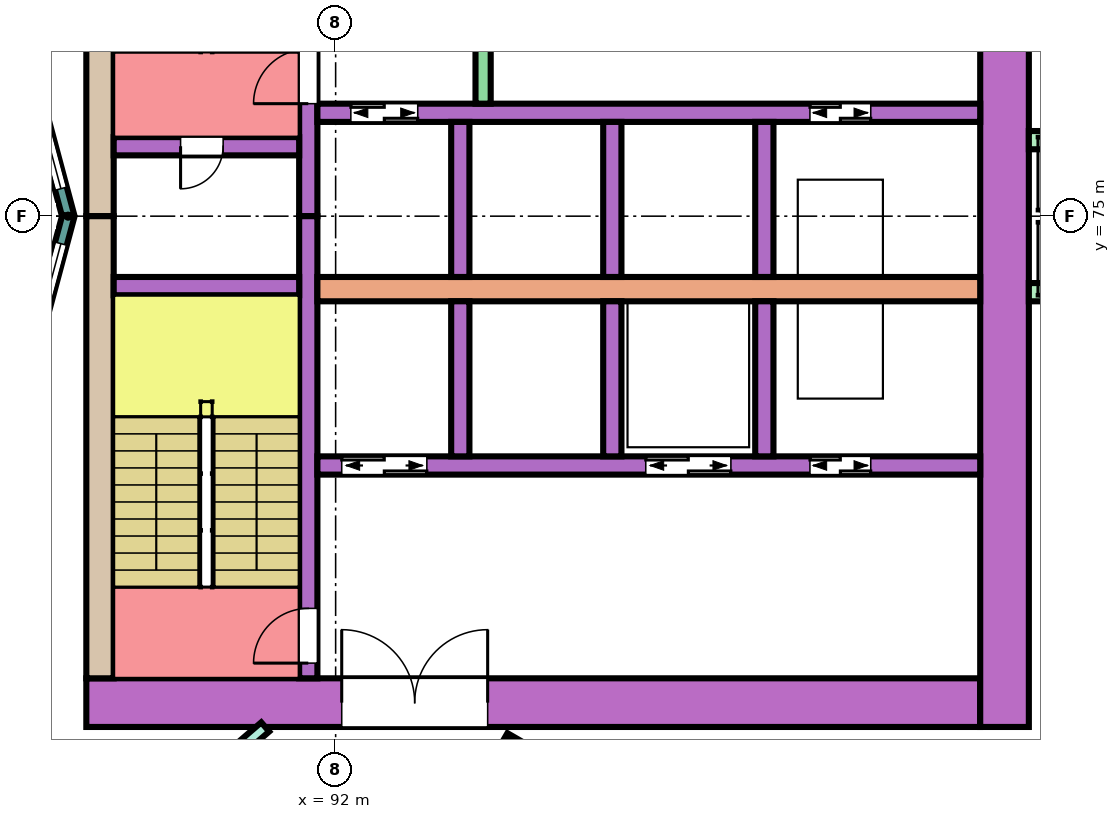
"""IFC4 building model, lengths in metres.
Left out: names, types, materials, properties, quantities, classifications, styles, units other than length and angle.
Written with IfcOpenShell. Run it as: python <this file> out.ifc"""

import sys

from ifc_helpers import new_model, si_unit, direction, frame, frame_2d, origin, place, context, subcontext, project, spatial, rectangle, extrude, element, fill, save


model = new_model("IFC4")
c1 = context("Model", 3, precision=1e-05, world=origin(), true_north=direction((0.0, 1.0)))
c2 = subcontext(c1, "Body", "Model", "MODEL_VIEW")
j1 = project(units=[si_unit("LENGTHUNIT", "METRE"), si_unit("PLANEANGLEUNIT", "RADIAN")], contexts=[c1])
p1 = place(None, origin())
s1 = spatial("IfcSite", under=j1, at=p1, CompositionType="ELEMENT")
p2 = place(p1, origin())
s2 = spatial("IfcBuilding", under=s1, at=p2, CompositionType="ELEMENT")
p3 = place(p2, frame((0.0, 0.0, 28.8)))
s3 = spatial("IfcBuildingStorey", under=s2, at=p3, CompositionType="ELEMENT", Elevation=28.8)
p4 = place(p3, frame((87.9, 67.0, 0.0), z_axis=(0.0, 0.0, 1.0), x_axis=(1.0, 0.0, 0.0)))
e1 = element("IfcWall", 1, at=p4, inside=s3, PredefinedType="SHEAR", context=c2, shape_type="SweptSolid", body=[
    extrude(rectangle(XDim=14.7, YDim=0.8, at=frame_2d((7.35, 0.0))), origin(), (0.0, 0.0, 1.0), 3.48),
])
p5 = place(p4, frame((4.2, 0.0, 0.0)))
e2 = element("IfcOpeningElement", 2, at=p5, cuts=e1, PredefinedType="OPENING", context=c2, shape_type="SweptSolid", body=[
    extrude(rectangle(XDim=2.4, YDim=2.4, at=frame_2d((1.2, 1.2))), frame((0.0, 0.41, 0.0), z_axis=(0.0, -1.0, 0.0), x_axis=(1.0, 0.0, 0.0)), (0.0, 0.0, 1.0), 0.82),
])
for number, where, z_axis, x_axis in (
    (3, (88.125, 75.0, 0.0), (0.0, 0.0, 1.0), (0.0, 1.0, 0.0)),
    (4, (88.125, 67.4, 0.0), (0.0, 0.0, 1.0), (0.0, 1.0, 0.0)),
):
    element("IfcWall", number, at=place(p3, frame(where, z_axis=z_axis, x_axis=x_axis)), inside=s3, PredefinedType="SHEAR", context=c2, shape_type="SweptSolid", body=[
        extrude(rectangle(XDim=7.6, YDim=0.45, at=frame_2d((3.8, 0.0))), origin(), (0.0, 0.0, 1.0), 3.48),
    ])
p6 = place(p3, frame((103.0, 66.6, 0.0), z_axis=(0.0, 0.0, 1.0), x_axis=(0.0, 1.0, 0.0)))
e5 = element("IfcWall", 5, at=p6, inside=s3, PredefinedType="SHEAR", context=c2, shape_type="SweptSolid", body=[
    extrude(rectangle(XDim=16.8, YDim=0.8, at=frame_2d((8.4, 0.0))), origin(), (0.0, 0.0, 1.0), 3.48),
])
p7 = place(p3, frame((91.55, 75.0, 0.0), z_axis=(0.0, 0.0, 1.0), x_axis=(0.0, 1.0, 0.0)))
e6 = element("IfcWall", 6, at=p7, inside=s3, PredefinedType="SHEAR", context=c2, shape_type="SweptSolid", body=[
    extrude(rectangle(XDim=7.6, YDim=0.3, at=frame_2d((3.8, 0.0))), origin(), (0.0, 0.0, 1.0), 3.48),
])
p8 = place(p7, frame((1.85, 0.0, 0.0)))
e7 = element("IfcOpeningElement", 7, at=p8, cuts=e6, PredefinedType="OPENING", context=c2, shape_type="SweptSolid", body=[
    extrude(rectangle(XDim=0.9, YDim=2.1, at=frame_2d((0.45, 1.05))), frame((0.0, 0.16, 0.0), z_axis=(0.0, -1.0, 0.0), x_axis=(1.0, 0.0, 0.0)), (0.0, 0.0, 1.0), 0.32),
])
p9 = place(p3, frame((91.55, 67.4, 0.0), z_axis=(0.0, 0.0, 1.0), x_axis=(0.0, 1.0, 0.0)))
e8 = element("IfcWall", 8, at=p9, inside=s3, PredefinedType="SHEAR", context=c2, shape_type="SweptSolid", body=[
    extrude(rectangle(XDim=7.6, YDim=0.3, at=frame_2d((3.8, 0.0))), origin(), (0.0, 0.0, 1.0), 3.48),
])
p10 = place(p9, frame((0.25, 0.0, 0.0)))
e9 = element("IfcOpeningElement", 9, at=p10, cuts=e8, PredefinedType="OPENING", context=c2, shape_type="SweptSolid", body=[
    extrude(rectangle(XDim=0.9, YDim=2.1, at=frame_2d((0.45, 1.05))), frame((0.0, 0.16, 0.0), z_axis=(0.0, -1.0, 0.0), x_axis=(1.0, 0.0, 0.0)), (0.0, 0.0, 1.0), 0.32),
])
p11 = place(p3, frame((88.35, 76.15, 0.0), z_axis=(0.0, 0.0, 1.0), x_axis=(1.0, 0.0, 0.0)))
e10 = element("IfcWall", 10, at=p11, inside=s3, PredefinedType="SHEAR", context=c2, shape_type="SweptSolid", body=[
    extrude(rectangle(XDim=3.05, YDim=0.3, at=frame_2d((1.525, 0.0))), origin(), (0.0, 0.0, 1.0), 3.48),
])
p12 = place(p11, frame((1.1, 0.0, 0.0)))
e11 = element("IfcOpeningElement", 11, at=p12, cuts=e10, PredefinedType="OPENING", context=c2, shape_type="SweptSolid", body=[
    extrude(rectangle(XDim=0.7, YDim=2.0, at=frame_2d((0.35, 1.0))), frame((0.0, 0.16, 0.0), z_axis=(0.0, -1.0, 0.0), x_axis=(1.0, 0.0, 0.0)), (0.0, 0.0, 1.0), 0.32),
])
p13 = place(p3, frame((88.35, 73.85, 0.0), z_axis=(0.0, 0.0, 1.0), x_axis=(1.0, 0.0, 0.0)))
e12 = element("IfcWall", 12, at=p13, inside=s3, PredefinedType="SHEAR", context=c2, shape_type="SweptSolid", body=[
    extrude(rectangle(XDim=3.05, YDim=0.3, at=frame_2d((1.525, 0.0))), origin(), (0.0, 0.0, 1.0), 3.48),
])
p14 = place(p3, frame((91.7, 76.7, 0.0), z_axis=(0.0, 0.0, 1.0), x_axis=(1.0, 0.0, 0.0)))
e13 = element("IfcWall", 13, at=p14, inside=s3, PredefinedType="SHEAR", context=c2, shape_type="SweptSolid", body=[
    extrude(rectangle(XDim=10.9, YDim=0.3, at=frame_2d((5.45, 0.0))), origin(), (0.0, 0.0, 1.0), 3.48),
])
p15 = place(p14, frame((0.55, 0.0, 0.0)))
e14 = element("IfcOpeningElement", 14, at=p15, cuts=e13, PredefinedType="OPENING", context=c2, shape_type="SweptSolid", body=[
    extrude(rectangle(XDim=1.1, YDim=2.1, at=frame_2d((0.55, 1.05))), frame((0.0, 0.16, 0.0), z_axis=(0.0, -1.0, 0.0), x_axis=(1.0, 0.0, 0.0)), (0.0, 0.0, 1.0), 0.32),
])
p16 = place(p14, frame((8.1, 0.0, 0.0)))
e15 = element("IfcOpeningElement", 15, at=p16, cuts=e13, PredefinedType="OPENING", context=c2, shape_type="SweptSolid", body=[
    extrude(rectangle(XDim=1.0, YDim=2.1, at=frame_2d((0.5, 1.05))), frame((0.0, 0.16, 0.0), z_axis=(0.0, -1.0, 0.0), x_axis=(1.0, 0.0, 0.0)), (0.0, 0.0, 1.0), 0.32),
])
p17 = place(p3, frame((91.7, 73.8, 0.0), z_axis=(0.0, 0.0, 1.0), x_axis=(1.0, 0.0, 0.0)))
e16 = element("IfcWall", 16, at=p17, inside=s3, PredefinedType="SHEAR", context=c2, shape_type="SweptSolid", body=[
    extrude(rectangle(XDim=10.9, YDim=0.4, at=frame_2d((5.45, 0.0))), origin(), (0.0, 0.0, 1.0), 3.48),
])
p18 = place(p3, frame((91.7, 70.9, 0.0), z_axis=(0.0, 0.0, 1.0), x_axis=(1.0, 0.0, 0.0)))
e17 = element("IfcWall", 17, at=p18, inside=s3, PredefinedType="SHEAR", context=c2, shape_type="SweptSolid", body=[
    extrude(rectangle(XDim=10.9, YDim=0.3, at=frame_2d((5.45, 0.0))), origin(), (0.0, 0.0, 1.0), 3.48),
])
p19 = place(p18, frame((0.4, 0.0, 0.0)))
e18 = element("IfcOpeningElement", 18, at=p19, cuts=e17, PredefinedType="OPENING", context=c2, shape_type="SweptSolid", body=[
    extrude(rectangle(XDim=1.4, YDim=2.1, at=frame_2d((0.7, 1.05))), frame((0.0, 0.16, 0.0), z_axis=(0.0, -1.0, 0.0), x_axis=(1.0, 0.0, 0.0)), (0.0, 0.0, 1.0), 0.32),
])
p20 = place(p18, frame((5.4, 0.0, 0.0)))
e19 = element("IfcOpeningElement", 19, at=p20, cuts=e17, PredefinedType="OPENING", context=c2, shape_type="SweptSolid", body=[
    extrude(rectangle(XDim=1.4, YDim=2.1, at=frame_2d((0.7, 1.05))), frame((0.0, 0.16, 0.0), z_axis=(0.0, -1.0, 0.0), x_axis=(1.0, 0.0, 0.0)), (0.0, 0.0, 1.0), 0.32),
])
p21 = place(p18, frame((8.1, 0.0, 0.0)))
e20 = element("IfcOpeningElement", 20, at=p21, cuts=e17, PredefinedType="OPENING", context=c2, shape_type="SweptSolid", body=[
    extrude(rectangle(XDim=1.0, YDim=2.1, at=frame_2d((0.5, 1.05))), frame((0.0, 0.16, 0.0), z_axis=(0.0, -1.0, 0.0), x_axis=(1.0, 0.0, 0.0)), (0.0, 0.0, 1.0), 0.32),
])
for number, where, z_axis, x_axis in (
    (21, (94.05, 74.0, 0.0), (0.0, 0.0, 1.0), (0.0, 1.0, 0.0)),
    (22, (96.55, 74.0, 0.0), (0.0, 0.0, 1.0), (0.0, 1.0, 0.0)),
    (23, (99.05, 74.0, 0.0), (0.0, 0.0, 1.0), (0.0, 1.0, 0.0)),
    (24, (94.05, 71.05, 0.0), (0.0, 0.0, 1.0), (0.0, 1.0, 0.0)),
    (25, (96.55, 71.05, 0.0), (0.0, 0.0, 1.0), (0.0, 1.0, 0.0)),
    (26, (99.05, 71.05, 0.0), (0.0, 0.0, 1.0), (0.0, 1.0, 0.0)),
):
    element("IfcWall", number, at=place(p3, frame(where, z_axis=z_axis, x_axis=x_axis)), inside=s3, PredefinedType="SHEAR", context=c2, shape_type="SweptSolid", body=[
        extrude(rectangle(XDim=2.55, YDim=0.3, at=frame_2d((1.275, 0.0))), origin(), (0.0, 0.0, 1.0), 3.48),
    ])
p22 = place(p3, frame((94.425, 76.85, 0.0), z_axis=(0.0, 0.0, 1.0), x_axis=(0.0, 1.0, 0.0)))
e27 = element("IfcWall", 27, at=p22, inside=s3, PredefinedType="SHEAR", context=c2, shape_type="SweptSolid", body=[
    extrude(rectangle(XDim=1.5, YDim=0.25, at=frame_2d((0.75, 0.0))), origin(), (0.0, 0.0, 1.0), 3.48),
])
p23 = place(p3, frame((102.429, 62.051, 0.0), z_axis=(0.0, 0.0, 1.0), x_axis=(0.382694096902, 0.923875115043, 0.0)))
e28 = element("IfcWall", 28, at=p23, inside=s3, PredefinedType="NOTDEFINED", context=c2, shape_type="SweptSolid", body=[
    extrude(rectangle(XDim=6.761, YDim=0.2, at=frame_2d((3.38, 0.0))), origin(), (0.0, 0.0, 1.0), 3.8),
])
p24 = place(p23, frame((0.527, 0.0, 0.9)))
e29 = element("IfcOpeningElement", 29, at=p24, cuts=e28, PredefinedType="OPENING", context=c2, shape_type="SweptSolid", body=[
    extrude(rectangle(XDim=1.2, YDim=2.4, at=frame_2d((0.6, 1.2))), frame((0.0, 0.11, 0.0), z_axis=(0.0, -1.0, 0.0), x_axis=(1.0, 0.0, 0.0)), (0.0, 0.0, 1.0), 0.22),
])
p25 = place(p23, frame((2.48, 0.0, 0.0)))
e30 = element("IfcOpeningElement", 30, at=p25, cuts=e28, PredefinedType="OPENING", context=c2, shape_type="SweptSolid", body=[
    extrude(rectangle(XDim=1.8, YDim=2.4, at=frame_2d((0.9, 1.2))), frame((0.0, 0.11, 0.0), z_axis=(0.0, -1.0, 0.0), x_axis=(1.0, 0.0, 0.0)), (0.0, 0.0, 1.0), 0.22),
])
p26 = place(p23, frame((5.034, 0.0, 0.9)))
e31 = element("IfcOpeningElement", 31, at=p26, cuts=e28, PredefinedType="OPENING", context=c2, shape_type="SweptSolid", body=[
    extrude(rectangle(XDim=1.2, YDim=2.4, at=frame_2d((0.6, 1.2))), frame((0.0, 0.11, 0.0), z_axis=(0.0, -1.0, 0.0), x_axis=(1.0, 0.0, 0.0)), (0.0, 0.0, 1.0), 0.22),
])
for number, where, z_axis, x_axis in (
    (32, (103.4, 73.75, 0.0), (0.0, 0.0, 1.0), (1.0, 0.0, 0.0)),
    (33, (103.4, 76.25, 0.0), (0.0, 0.0, 1.0), (1.0, 0.0, 0.0)),
):
    element("IfcWall", number, at=place(p3, frame(where, z_axis=z_axis, x_axis=x_axis)), inside=s3, PredefinedType="NOTDEFINED", context=c2, shape_type="SweptSolid", body=[
        extrude(rectangle(XDim=2.416, YDim=0.3, at=frame_2d((1.208, 0.0))), origin(), (0.0, 0.0, 1.0), 3.8),
    ])
p27 = place(p3, frame((87.604, 75.0, 0.0), z_axis=(0.0, 0.0, 1.0), x_axis=(-0.258789828301, 0.965933654434, 0.0)))
e34 = element("IfcWall", 34, at=p27, inside=s3, PredefinedType="NOTDEFINED", context=c2, shape_type="SweptSolid", body=[
    extrude(rectangle(XDim=3.936, YDim=0.2, at=frame_2d((1.968, 0.0))), origin(), (0.0, 0.0, 1.0), 3.8),
])
p28 = place(p27, frame((0.468, 0.0, 0.9)))
e35 = element("IfcOpeningElement", 35, at=p28, cuts=e34, PredefinedType="OPENING", context=c2, shape_type="SweptSolid", body=[
    extrude(rectangle(XDim=3.0, YDim=2.3, at=frame_2d((1.5, 1.15))), frame((0.0, 0.11, 0.0), z_axis=(0.0, -1.0, 0.0), x_axis=(1.0, 0.0, 0.0)), (0.0, 0.0, 1.0), 0.22),
])
p29 = place(p3, frame((86.585, 71.198, 0.0), z_axis=(0.0, 0.0, 1.0), x_axis=(0.258789828301, 0.965933654434, 0.0)))
e36 = element("IfcWall", 36, at=p29, inside=s3, PredefinedType="NOTDEFINED", context=c2, shape_type="SweptSolid", body=[
    extrude(rectangle(XDim=3.936, YDim=0.2, at=frame_2d((1.968, 0.0))), origin(), (0.0, 0.0, 1.0), 3.8),
])
p30 = place(p29, frame((0.468, 0.0, 0.9)))
e37 = element("IfcOpeningElement", 37, at=p30, cuts=e36, PredefinedType="OPENING", context=c2, shape_type="SweptSolid", body=[
    extrude(rectangle(XDim=3.0, YDim=2.3, at=frame_2d((1.5, 1.15))), frame((0.0, 0.11, 0.0), z_axis=(0.0, -1.0, 0.0), x_axis=(1.0, 0.0, 0.0)), (0.0, 0.0, 1.0), 0.22),
])
p31 = place(p3, frame((86.877, 63.189, 0.0), z_axis=(0.0, 0.0, 1.0), x_axis=(0.758075808328, 0.652166442581, 0.0)))
e38 = element("IfcWall", 38, at=p31, inside=s3, PredefinedType="PARTITIONING", context=c2, shape_type="SweptSolid", body=[
    extrude(rectangle(XDim=5.23, YDim=0.2, at=frame_2d((2.615, 0.0))), origin(), (0.0, 0.0, 1.0), 3.35),
])
p32 = place(p31, frame((2.165, 0.0, 0.0)))
e39 = element("IfcOpeningElement", 39, at=p32, cuts=e38, PredefinedType="OPENING", context=c2, shape_type="SweptSolid", body=[
    extrude(rectangle(XDim=0.9, YDim=2.1, at=frame_2d((0.45, 1.05))), frame((0.0, 0.11, 0.0), z_axis=(0.0, -1.0, 0.0), x_axis=(1.0, 0.0, 0.0)), (0.0, 0.0, 1.0), 0.22),
])
p33 = place(p3, frame((94.8, 66.455, 0.0), z_axis=(0.0, 0.0, 1.0), x_axis=(0.86602264145, -0.500004784474, 0.0)))
e40 = element("IfcWall", 40, at=p33, inside=s3, PredefinedType="PARTITIONING", context=c2, shape_type="SweptSolid", body=[
    extrude(rectangle(XDim=8.708, YDim=0.1, at=frame_2d((4.354, 0.0))), origin(), (0.0, 0.0, 1.0), 3.35),
])
p34 = place(p33, frame((3.879, 0.0, 0.0)))
e41 = element("IfcOpeningElement", 41, at=p34, cuts=e40, PredefinedType="OPENING", context=c2, shape_type="SweptSolid", body=[
    extrude(rectangle(XDim=0.9, YDim=2.1, at=frame_2d((0.45, 1.05))), frame((0.0, 0.06, 0.0), z_axis=(0.0, -1.0, 0.0), x_axis=(1.0, 0.0, 0.0)), (0.0, 0.0, 1.0), 0.12),
])
p35 = place(p28, origin())
e42 = element("IfcWindow", 42, at=p35, inside=s3, PartitioningType="SINGLE_PANEL", PredefinedType="WINDOW", context=c2, shape_type="SweptSolid", body=[
    extrude(rectangle(XDim=3.0, YDim=2.3, at=frame_2d((1.5, 1.15))), frame((0.0, 0.03, 0.0), z_axis=(0.0, -1.0, 0.0), x_axis=(1.0, 0.0, 0.0)), (0.0, 0.0, 1.0), 0.06),
])
fill(e35, e42)
p36 = place(p30, origin())
e43 = element("IfcWindow", 43, at=p36, inside=s3, PartitioningType="SINGLE_PANEL", PredefinedType="WINDOW", context=c2, shape_type="SweptSolid", body=[
    extrude(rectangle(XDim=3.0, YDim=2.3, at=frame_2d((1.5, 1.15))), frame((0.0, 0.03, 0.0), z_axis=(0.0, -1.0, 0.0), x_axis=(1.0, 0.0, 0.0)), (0.0, 0.0, 1.0), 0.06),
])
fill(e37, e43)
p37 = place(p12, frame((0.7, 0.0, 0.0), z_axis=(0.0, 0.0, 1.0), x_axis=(-1.0, 0.0, 0.0)))
e44 = element("IfcDoor", 44, at=p37, inside=s3, OperationType="SINGLE_SWING_RIGHT", PredefinedType="DOOR", context=c2, shape_type="SweptSolid", body=[
    extrude(rectangle(XDim=0.7, YDim=2.0, at=frame_2d((0.35, 1.0))), frame((0.0, 0.025, 0.0), z_axis=(0.0, -1.0, 0.0), x_axis=(1.0, 0.0, 0.0)), (0.0, 0.0, 1.0), 0.05),
])
fill(e11, e44)
p38 = place(p8, origin())
e45 = element("IfcDoor", 45, at=p38, inside=s3, OperationType="SINGLE_SWING_LEFT", PredefinedType="DOOR", context=c2, shape_type="SweptSolid", body=[
    extrude(rectangle(XDim=0.9, YDim=2.1, at=frame_2d((0.45, 1.05))), frame((0.0, 0.025, 0.0), z_axis=(0.0, -1.0, 0.0), x_axis=(1.0, 0.0, 0.0)), (0.0, 0.0, 1.0), 0.05),
])
fill(e7, e45)
p39 = place(p10, origin())
e46 = element("IfcDoor", 46, at=p39, inside=s3, OperationType="SINGLE_SWING_LEFT", PredefinedType="DOOR", context=c2, shape_type="SweptSolid", body=[
    extrude(rectangle(XDim=0.9, YDim=2.1, at=frame_2d((0.45, 1.05))), frame((0.0, 0.025, 0.0), z_axis=(0.0, -1.0, 0.0), x_axis=(1.0, 0.0, 0.0)), (0.0, 0.0, 1.0), 0.05),
])
fill(e9, e46)
p40 = place(p15, origin())
e47 = element("IfcDoor", 47, at=p40, inside=s3, OperationType="DOUBLE_DOOR_SLIDING", PredefinedType="DOOR", context=c2, shape_type="SweptSolid", body=[
    extrude(rectangle(XDim=1.1, YDim=2.1, at=frame_2d((0.55, 1.05))), frame((0.0, 0.025, 0.0), z_axis=(0.0, -1.0, 0.0), x_axis=(1.0, 0.0, 0.0)), (0.0, 0.0, 1.0), 0.05),
])
fill(e14, e47)
p41 = place(p16, origin())
e48 = element("IfcDoor", 48, at=p41, inside=s3, OperationType="DOUBLE_DOOR_SLIDING", PredefinedType="DOOR", context=c2, shape_type="SweptSolid", body=[
    extrude(rectangle(XDim=1.0, YDim=2.1, at=frame_2d((0.5, 1.05))), frame((0.0, 0.025, 0.0), z_axis=(0.0, -1.0, 0.0), x_axis=(1.0, 0.0, 0.0)), (0.0, 0.0, 1.0), 0.05),
])
fill(e15, e48)
p42 = place(p19, origin())
e49 = element("IfcDoor", 49, at=p42, inside=s3, OperationType="DOUBLE_DOOR_SLIDING", PredefinedType="DOOR", context=c2, shape_type="SweptSolid", body=[
    extrude(rectangle(XDim=1.4, YDim=2.1, at=frame_2d((0.7, 1.05))), frame((0.0, 0.025, 0.0), z_axis=(0.0, -1.0, 0.0), x_axis=(1.0, 0.0, 0.0)), (0.0, 0.0, 1.0), 0.05),
])
fill(e18, e49)
p43 = place(p20, origin())
e50 = element("IfcDoor", 50, at=p43, inside=s3, OperationType="DOUBLE_DOOR_SLIDING", PredefinedType="DOOR", context=c2, shape_type="SweptSolid", body=[
    extrude(rectangle(XDim=1.4, YDim=2.1, at=frame_2d((0.7, 1.05))), frame((0.0, 0.025, 0.0), z_axis=(0.0, -1.0, 0.0), x_axis=(1.0, 0.0, 0.0)), (0.0, 0.0, 1.0), 0.05),
])
fill(e19, e50)
p44 = place(p21, origin())
e51 = element("IfcDoor", 51, at=p44, inside=s3, OperationType="DOUBLE_DOOR_SLIDING", PredefinedType="DOOR", context=c2, shape_type="SweptSolid", body=[
    extrude(rectangle(XDim=1.0, YDim=2.1, at=frame_2d((0.5, 1.05))), frame((0.0, 0.025, 0.0), z_axis=(0.0, -1.0, 0.0), x_axis=(1.0, 0.0, 0.0)), (0.0, 0.0, 1.0), 0.05),
])
fill(e20, e51)
p45 = place(p5, origin())
e52 = element("IfcDoor", 52, at=p45, inside=s3, OperationType="DOUBLE_DOOR_SINGLE_SWING", PredefinedType="DOOR", context=c2, shape_type="SweptSolid", body=[
    extrude(rectangle(XDim=2.4, YDim=2.4, at=frame_2d((1.2, 1.2))), frame((0.0, 0.025, 0.0), z_axis=(0.0, -1.0, 0.0), x_axis=(1.0, 0.0, 0.0)), (0.0, 0.0, 1.0), 0.05),
])
fill(e2, e52)
save(model, sys.argv[1])
